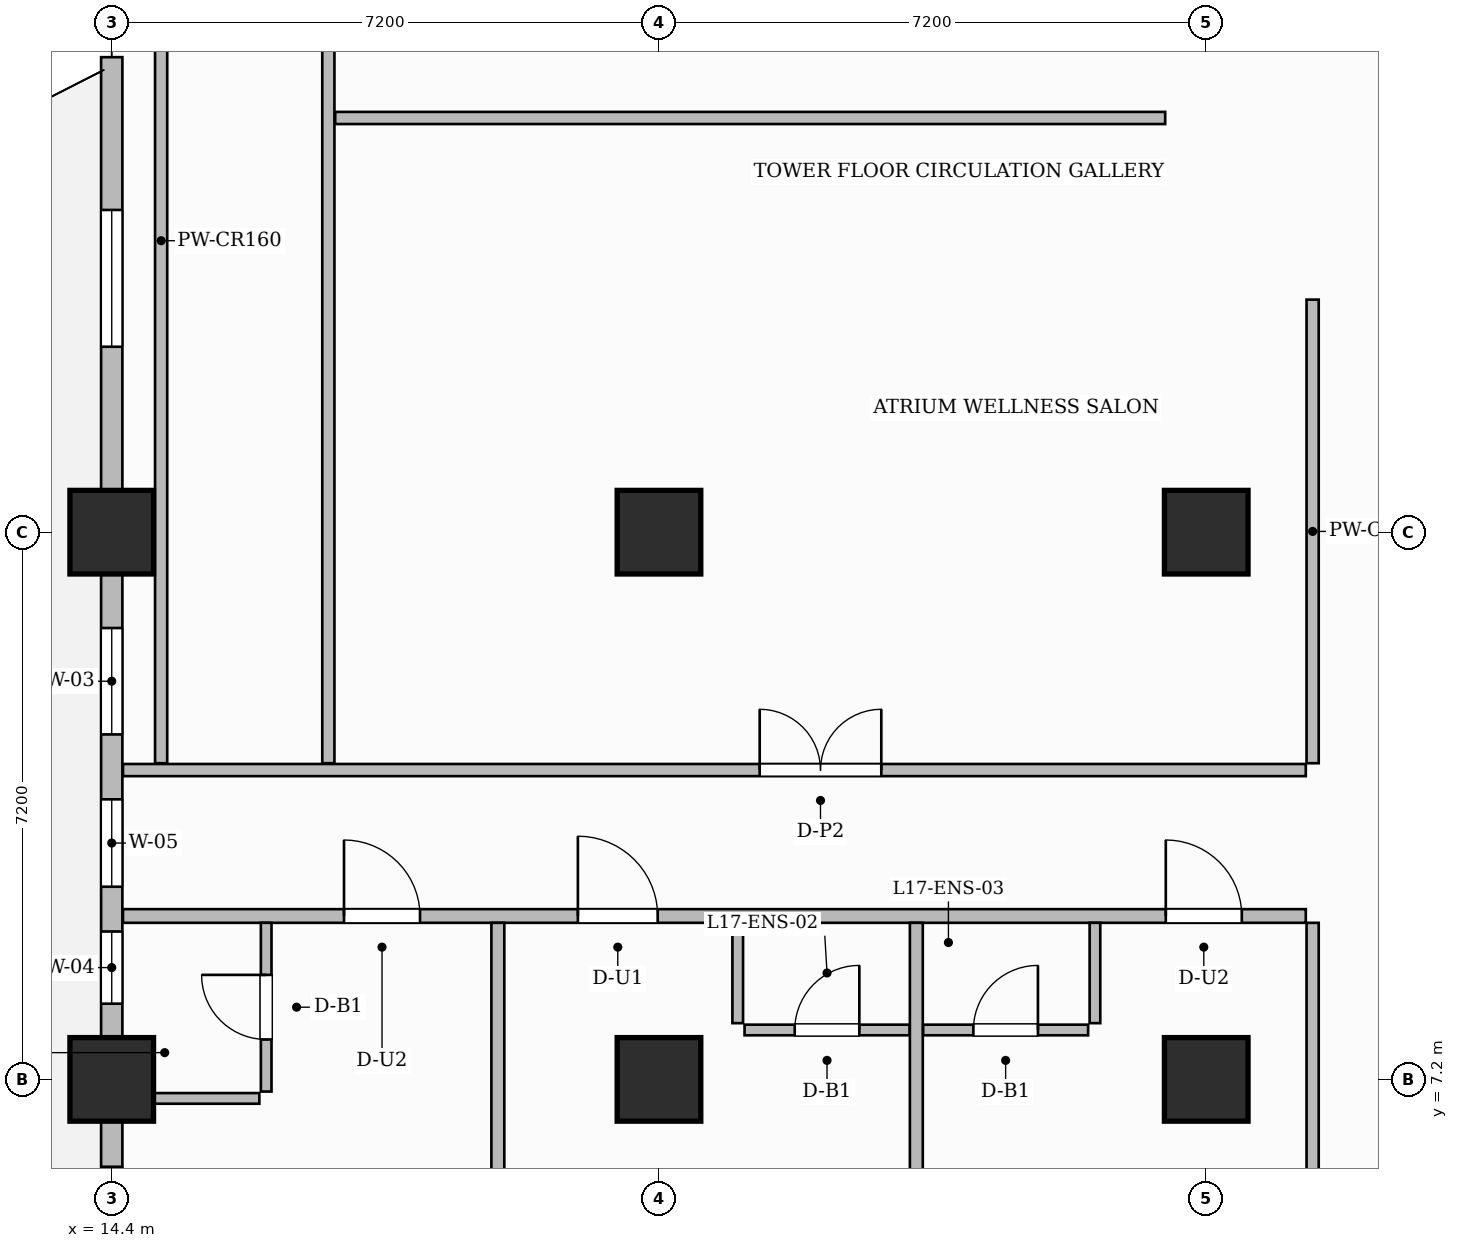
"""IFC4 building model, lengths in metres.
Left out: names, types, materials, properties, quantities, classifications, styles, units other than length and angle.
Written with IfcOpenShell. Run it as: python <this file> out.ifc"""

import sys

from ifc_helpers import new_model, si_unit, direction, frame, frame_2d, origin, origin_2d, place, context, subcontext, project, spatial, rectangle, extrude, source, transform, mapped, element, fill, save


model = new_model("IFC4")
c1 = context("Model", 3, precision=1e-05, world=origin(), true_north=direction((0.0, 1.0)))
c2 = subcontext(c1, "Body", "Model", "MODEL_VIEW")
j1 = project(units=[si_unit("LENGTHUNIT", "METRE"), si_unit("PLANEANGLEUNIT", "RADIAN")], contexts=[c1])
p1 = place(None, origin())
s1 = spatial("IfcSite", under=j1, at=p1, CompositionType="ELEMENT")
p2 = place(p1, origin())
s2 = spatial("IfcBuilding", under=s1, at=p2, CompositionType="ELEMENT")
p3 = place(p2, frame((0.0, 0.0, 73.1)))
s3 = spatial("IfcBuildingStorey", under=s2, at=p3, CompositionType="ELEMENT", Elevation=73.1)
m1 = source(origin(), c2, "Body", "SweptSolid", [
    extrude(rectangle(XDim=1.1, YDim=1.1, at=origin_2d()), origin(), (0.0, 0.0, 1.0), 3.7),
])
for number, where, z_axis, x_axis in (
    (1, (14.4, 7.2, 0.0), (0.0, 0.0, 1.0), (1.0, 0.0, 0.0)),
    (2, (14.4, 14.4, 0.0), (0.0, 0.0, 1.0), (1.0, 0.0, 0.0)),
    (3, (21.6, 7.2, 0.0), (0.0, 0.0, 1.0), (1.0, 0.0, 0.0)),
    (4, (21.6, 14.4, 0.0), (0.0, 0.0, 1.0), (1.0, 0.0, 0.0)),
    (5, (28.8, 7.2, 0.0), (0.0, 0.0, 1.0), (1.0, 0.0, 0.0)),
    (6, (28.8, 14.4, 0.0), (0.0, 0.0, 1.0), (1.0, 0.0, 0.0)),
):
    element("IfcColumn", number, at=place(p3, frame(where, z_axis=z_axis, x_axis=x_axis)), inside=s3, PredefinedType="COLUMN", context=c2, shape_type="MappedRepresentation", body=[
        mapped(m1, transform((0.0, 0.0, 0.0), scale=1.0)),
    ])
p4 = place(p3, frame((14.548, 9.35, 0.0), z_axis=(0.0, 0.0, 1.0), x_axis=(1.0, 0.0, 0.0)))
e7 = element("IfcWall", 7, at=p4, inside=s3, PredefinedType="PARTITIONING", context=c2, shape_type="SweptSolid", body=[
    extrude(rectangle(XDim=15.562, YDim=0.18, at=frame_2d((7.781, 0.0))), origin(), (0.0, 0.0, 1.0), 3.45),
])
p5 = place(p4, frame((2.908, 0.0, 0.0)))
e8 = element("IfcOpeningElement", 8, at=p5, cuts=e7, PredefinedType="OPENING", context=c2, shape_type="SweptSolid", body=[
    extrude(rectangle(XDim=1.0, YDim=2.2, at=frame_2d((0.5, 1.1))), frame((0.0, 0.1, 0.0), z_axis=(0.0, -1.0, 0.0), x_axis=(1.0, 0.0, 0.0)), (0.0, 0.0, 1.0), 0.2),
])
p6 = place(p4, frame((5.985, 0.0, 0.0)))
e9 = element("IfcOpeningElement", 9, at=p6, cuts=e7, PredefinedType="OPENING", context=c2, shape_type="SweptSolid", body=[
    extrude(rectangle(XDim=1.05, YDim=2.25, at=frame_2d((0.525, 1.125))), frame((0.0, 0.1, 0.0), z_axis=(0.0, -1.0, 0.0), x_axis=(1.0, 0.0, 0.0)), (0.0, 0.0, 1.0), 0.2),
])
p7 = place(p4, frame((13.72, 0.0, 0.0)))
e10 = element("IfcOpeningElement", 10, at=p7, cuts=e7, PredefinedType="OPENING", context=c2, shape_type="SweptSolid", body=[
    extrude(rectangle(XDim=1.0, YDim=2.2, at=frame_2d((0.5, 1.1))), frame((0.0, 0.1, 0.0), z_axis=(0.0, -1.0, 0.0), x_axis=(1.0, 0.0, 0.0)), (0.0, 0.0, 1.0), 0.2),
])
p8 = place(p3, frame((14.548, 11.27, 0.0), z_axis=(0.0, 0.0, 1.0), x_axis=(1.0, 0.0, 0.0)))
e11 = element("IfcWall", 11, at=p8, inside=s3, PredefinedType="PARTITIONING", context=c2, shape_type="SweptSolid", body=[
    extrude(rectangle(XDim=15.562, YDim=0.16, at=frame_2d((7.781, 0.0))), origin(), (0.0, 0.0, 1.0), 3.45),
])
p9 = place(p8, frame((8.377, 0.0, 0.0)))
e12 = element("IfcOpeningElement", 12, at=p9, cuts=e11, PredefinedType="OPENING", context=c2, shape_type="SweptSolid", body=[
    extrude(rectangle(XDim=1.6, YDim=2.4, at=frame_2d((0.8, 1.2))), frame((0.0, 0.09, 0.0), z_axis=(0.0, -1.0, 0.0), x_axis=(1.0, 0.0, 0.0)), (0.0, 0.0, 1.0), 0.18),
])
p10 = place(p3, frame((30.2, 11.36, 0.0), z_axis=(0.0, 0.0, 1.0), x_axis=(0.0, 1.0, 0.0)))
e13 = element("IfcWall", 13, at=p10, inside=s3, PredefinedType="PARTITIONING", context=c2, shape_type="SweptSolid", body=[
    extrude(rectangle(XDim=6.1, YDim=0.16, at=frame_2d((3.05, 0.0))), origin(), (0.0, 0.0, 1.0), 3.45),
])
p11 = place(p3, frame((30.2, 0.148, 0.0), z_axis=(0.0, 0.0, 1.0), x_axis=(0.0, 1.0, 0.0)))
e14 = element("IfcWall", 14, at=p11, inside=s3, PredefinedType="PARTITIONING", context=c2, shape_type="SweptSolid", body=[
    extrude(rectangle(XDim=9.112, YDim=0.16, at=frame_2d((4.556, 0.0))), origin(), (0.0, 0.0, 1.0), 3.45),
])
p12 = place(p11, frame((1.977, 0.0, 0.0)))
e15 = element("IfcOpeningElement", 15, at=p12, cuts=e14, PredefinedType="OPENING", context=c2, shape_type="SweptSolid", body=[
    extrude(rectangle(XDim=1.05, YDim=2.15, at=frame_2d((0.525, 1.075))), frame((0.0, 0.09, 0.0), z_axis=(0.0, -1.0, 0.0), x_axis=(1.0, 0.0, 0.0)), (0.0, 0.0, 1.0), 0.18),
])
p13 = place(p3, frame((19.48, 0.148, 0.0), z_axis=(0.0, 0.0, 1.0), x_axis=(0.0, 1.0, 0.0)))
e16 = element("IfcWall", 16, at=p13, inside=s3, PredefinedType="PARTITIONING", context=c2, shape_type="SweptSolid", body=[
    extrude(rectangle(XDim=9.112, YDim=0.17, at=frame_2d((4.556, 0.0))), origin(), (0.0, 0.0, 1.0), 3.45),
])
p14 = place(p3, frame((24.986, 0.148, 0.0), z_axis=(0.0, 0.0, 1.0), x_axis=(0.0, 1.0, 0.0)))
e17 = element("IfcWall", 17, at=p14, inside=s3, PredefinedType="PARTITIONING", context=c2, shape_type="SweptSolid", body=[
    extrude(rectangle(XDim=9.112, YDim=0.17, at=frame_2d((4.556, 0.0))), origin(), (0.0, 0.0, 1.0), 3.075),
])
p15 = place(p3, frame((16.432, 7.04, 0.0), z_axis=(0.0, 0.0, 1.0), x_axis=(0.0, 1.0, 0.0)))
e18 = element("IfcWall", 18, at=p15, inside=s3, PredefinedType="PARTITIONING", context=c2, shape_type="SweptSolid", body=[
    extrude(rectangle(XDim=2.22, YDim=0.14, at=frame_2d((1.11, 0.0))), origin(), (0.0, 0.0, 1.0), 3.45),
])
p16 = place(p15, frame((0.685, 0.0, 0.0)))
e19 = element("IfcOpeningElement", 19, at=p16, cuts=e18, PredefinedType="OPENING", context=c2, shape_type="SweptSolid", body=[
    extrude(rectangle(XDim=0.85, YDim=2.1, at=frame_2d((0.425, 1.05))), frame((0.0, 0.08, 0.0), z_axis=(0.0, -1.0, 0.0), x_axis=(1.0, 0.0, 0.0)), (0.0, 0.0, 1.0), 0.16),
])
p17 = place(p3, frame((14.49, 6.95, 0.0), z_axis=(0.0, 0.0, 1.0), x_axis=(1.0, 0.0, 0.0)))
e20 = element("IfcWall", 20, at=p17, inside=s3, PredefinedType="PARTITIONING", context=c2, shape_type="SweptSolid", body=[
    extrude(rectangle(XDim=1.852, YDim=0.14, at=frame_2d((0.926, 0.0))), origin(), (0.0, 0.0, 1.0), 2.885),
])
p18 = place(p3, frame((22.636, 7.94, 0.0), z_axis=(0.0, 0.0, 1.0), x_axis=(0.0, 1.0, 0.0)))
e21 = element("IfcWall", 21, at=p18, inside=s3, PredefinedType="PARTITIONING", context=c2, shape_type="SweptSolid", body=[
    extrude(rectangle(XDim=1.32, YDim=0.14, at=frame_2d((0.66, 0.0))), origin(), (0.0, 0.0, 1.0), 3.45),
])
p19 = place(p3, frame((22.726, 7.85, 0.0), z_axis=(0.0, 0.0, 1.0), x_axis=(1.0, 0.0, 0.0)))
e22 = element("IfcWall", 22, at=p19, inside=s3, PredefinedType="PARTITIONING", context=c2, shape_type="SweptSolid", body=[
    extrude(rectangle(XDim=2.17, YDim=0.14, at=frame_2d((1.085, 0.0))), origin(), (0.0, 0.0, 1.0), 3.45),
])
p20 = place(p19, frame((0.66, 0.0, 0.0)))
e23 = element("IfcOpeningElement", 23, at=p20, cuts=e22, PredefinedType="OPENING", context=c2, shape_type="SweptSolid", body=[
    extrude(rectangle(XDim=0.85, YDim=2.1, at=frame_2d((0.425, 1.05))), frame((0.0, 0.08, 0.0), z_axis=(0.0, -1.0, 0.0), x_axis=(1.0, 0.0, 0.0)), (0.0, 0.0, 1.0), 0.16),
])
p21 = place(p3, frame((27.336, 7.94, 0.0), z_axis=(0.0, 0.0, 1.0), x_axis=(0.0, 1.0, 0.0)))
e24 = element("IfcWall", 24, at=p21, inside=s3, PredefinedType="PARTITIONING", context=c2, shape_type="SweptSolid", body=[
    extrude(rectangle(XDim=1.32, YDim=0.14, at=frame_2d((0.66, 0.0))), origin(), (0.0, 0.0, 1.0), 3.45),
])
p22 = place(p3, frame((25.076, 7.85, 0.0), z_axis=(0.0, 0.0, 1.0), x_axis=(1.0, 0.0, 0.0)))
e25 = element("IfcWall", 25, at=p22, inside=s3, PredefinedType="PARTITIONING", context=c2, shape_type="SweptSolid", body=[
    extrude(rectangle(XDim=2.17, YDim=0.14, at=frame_2d((1.085, 0.0))), origin(), (0.0, 0.0, 1.0), 3.45),
])
p23 = place(p22, frame((0.66, 0.0, 0.0)))
e26 = element("IfcOpeningElement", 26, at=p23, cuts=e25, PredefinedType="OPENING", context=c2, shape_type="SweptSolid", body=[
    extrude(rectangle(XDim=0.85, YDim=2.1, at=frame_2d((0.425, 1.05))), frame((0.0, 0.08, 0.0), z_axis=(0.0, -1.0, 0.0), x_axis=(1.0, 0.0, 0.0)), (0.0, 0.0, 1.0), 0.16),
])
for number, where, z_axis, x_axis in (
    (27, (15.05, 11.36, 0.0), (0.0, 0.0, 1.0), (0.0, 1.0, 0.0)),
    (28, (17.25, 11.36, 0.0), (0.0, 0.0, 1.0), (0.0, 1.0, 0.0)),
):
    element("IfcWall", number, at=place(p3, frame(where, z_axis=z_axis, x_axis=x_axis)), inside=s3, PredefinedType="PARTITIONING", context=c2, shape_type="SweptSolid", body=[
        extrude(rectangle(XDim=13.75, YDim=0.16, at=frame_2d((6.875, 0.0))), origin(), (0.0, 0.0, 1.0), 3.45),
    ])
p24 = place(p3, frame((17.34, 19.85, 0.0), z_axis=(0.0, 0.0, 1.0), x_axis=(1.0, 0.0, 0.0)))
e29 = element("IfcWall", 29, at=p24, inside=s3, PredefinedType="PARTITIONING", context=c2, shape_type="SweptSolid", body=[
    extrude(rectangle(XDim=10.92, YDim=0.16, at=frame_2d((5.46, 0.0))), origin(), (0.0, 0.0, 1.0), 3.45),
])
p25 = place(p3, frame((14.4, 0.05, 0.0), z_axis=(0.0, 0.0, 1.0), x_axis=(0.0, 1.0, 0.0)))
e30 = element("IfcWall", 30, at=p25, inside=s3, PredefinedType="SOLIDWALL", context=c2, shape_type="SweptSolid", body=[
    extrude(rectangle(XDim=20.6, YDim=0.28, at=frame_2d((10.3, 0.0))), origin(), (0.0, 0.0, 1.0), 2.885),
])
p26 = place(p25, frame((2.75, 0.0, 0.0)))
e31 = element("IfcOpeningElement", 31, at=p26, cuts=e30, PredefinedType="OPENING", context=c2, shape_type="SweptSolid", body=[
    extrude(rectangle(XDim=1.2, YDim=2.2, at=frame_2d((0.6, 1.1))), frame((0.0, 0.15, 0.0), z_axis=(0.0, -1.0, 0.0), x_axis=(1.0, 0.0, 0.0)), (0.0, 0.0, 1.0), 0.3),
])
p27 = place(p25, frame((1.025, 0.0, 0.8)))
e32 = element("IfcOpeningElement", 32, at=p27, cuts=e30, PredefinedType="OPENING", context=c2, shape_type="SweptSolid", body=[
    extrude(rectangle(XDim=1.15, YDim=1.8, at=frame_2d((0.575, 0.9))), frame((0.0, 0.15, 0.0), z_axis=(0.0, -1.0, 0.0), x_axis=(1.0, 0.0, 0.0)), (0.0, 0.0, 1.0), 0.3),
])
p28 = place(p25, frame((4.6, 0.0, 0.8)))
e33 = element("IfcOpeningElement", 33, at=p28, cuts=e30, PredefinedType="OPENING", context=c2, shape_type="SweptSolid", body=[
    extrude(rectangle(XDim=1.4, YDim=1.85, at=frame_2d((0.7, 0.925))), frame((0.0, 0.15, 0.0), z_axis=(0.0, -1.0, 0.0), x_axis=(1.0, 0.0, 0.0)), (0.0, 0.0, 1.0), 0.3),
])
p29 = place(p25, frame((8.146, 0.0, 0.8)))
e34 = element("IfcOpeningElement", 34, at=p29, cuts=e30, PredefinedType="OPENING", context=c2, shape_type="SweptSolid", body=[
    extrude(rectangle(XDim=0.95, YDim=1.75, at=frame_2d((0.475, 0.875))), frame((0.0, 0.15, 0.0), z_axis=(0.0, -1.0, 0.0), x_axis=(1.0, 0.0, 0.0)), (0.0, 0.0, 1.0), 0.3),
])
p30 = place(p25, frame((9.685, 0.0, 0.8)))
e35 = element("IfcOpeningElement", 35, at=p30, cuts=e30, PredefinedType="OPENING", context=c2, shape_type="SweptSolid", body=[
    extrude(rectangle(XDim=1.15, YDim=1.8, at=frame_2d((0.575, 0.9))), frame((0.0, 0.15, 0.0), z_axis=(0.0, -1.0, 0.0), x_axis=(1.0, 0.0, 0.0)), (0.0, 0.0, 1.0), 0.3),
])
p31 = place(p25, frame((11.689, 0.0, 0.8)))
e36 = element("IfcOpeningElement", 36, at=p31, cuts=e30, PredefinedType="OPENING", context=c2, shape_type="SweptSolid", body=[
    extrude(rectangle(XDim=1.4, YDim=1.85, at=frame_2d((0.7, 0.925))), frame((0.0, 0.15, 0.0), z_axis=(0.0, -1.0, 0.0), x_axis=(1.0, 0.0, 0.0)), (0.0, 0.0, 1.0), 0.3),
])
p32 = place(p25, frame((16.79, 0.0, 0.8)))
e37 = element("IfcOpeningElement", 37, at=p32, cuts=e30, PredefinedType="OPENING", context=c2, shape_type="SweptSolid", body=[
    extrude(rectangle(XDim=1.8, YDim=1.85, at=frame_2d((0.9, 0.925))), frame((0.0, 0.15, 0.0), z_axis=(0.0, -1.0, 0.0), x_axis=(1.0, 0.0, 0.0)), (0.0, 0.0, 1.0), 0.3),
])
m2 = source(origin(), c2, "Body", "SweptSolid", [
    extrude(rectangle(XDim=0.85, YDim=2.1, at=frame_2d((0.425, 1.05))), frame((0.0, 0.025, 0.0), z_axis=(0.0, -1.0, 0.0), x_axis=(1.0, 0.0, 0.0)), (0.0, 0.0, 1.0), 0.05),
])
p33 = place(p16, origin())
e38 = element("IfcDoor", 38, at=p33, inside=s3, OperationType="SINGLE_SWING_RIGHT", PredefinedType="DOOR", context=c2, shape_type="MappedRepresentation", body=[
    mapped(m2, transform((0.0, 0.0, 0.0), scale=1.0)),
])
fill(e19, e38)
m3 = source(origin(), c2, "Body", "SweptSolid", [
    extrude(rectangle(XDim=1.0, YDim=2.2, at=frame_2d((0.5, 1.1))), frame((0.0, 0.025, 0.0), z_axis=(0.0, -1.0, 0.0), x_axis=(1.0, 0.0, 0.0)), (0.0, 0.0, 1.0), 0.05),
])
p34 = place(p5, origin())
e39 = element("IfcDoor", 39, at=p34, inside=s3, OperationType="SINGLE_SWING_LEFT", PredefinedType="DOOR", context=c2, shape_type="MappedRepresentation", body=[
    mapped(m3, transform((0.0, 0.0, 0.0), scale=1.0)),
])
fill(e8, e39)
p35 = place(p20, origin())
e40 = element("IfcDoor", 40, at=p35, inside=s3, OperationType="SINGLE_SWING_RIGHT", PredefinedType="DOOR", context=c2, shape_type="MappedRepresentation", body=[
    mapped(m2, transform((0.0, 0.0, 0.0), scale=1.0)),
])
fill(e23, e40)
m4 = source(origin(), c2, "Body", "SweptSolid", [
    extrude(rectangle(XDim=1.05, YDim=2.25, at=frame_2d((0.525, 1.125))), frame((0.0, 0.025, 0.0), z_axis=(0.0, -1.0, 0.0), x_axis=(1.0, 0.0, 0.0)), (0.0, 0.0, 1.0), 0.05),
])
p36 = place(p6, origin())
e41 = element("IfcDoor", 41, at=p36, inside=s3, OperationType="SINGLE_SWING_LEFT", PredefinedType="DOOR", context=c2, shape_type="MappedRepresentation", body=[
    mapped(m4, transform((0.0, 0.0, 0.0), scale=1.0)),
])
fill(e9, e41)
p37 = place(p23, origin())
e42 = element("IfcDoor", 42, at=p37, inside=s3, OperationType="SINGLE_SWING_RIGHT", PredefinedType="DOOR", context=c2, shape_type="MappedRepresentation", body=[
    mapped(m2, transform((0.0, 0.0, 0.0), scale=1.0)),
])
fill(e26, e42)
p38 = place(p7, origin())
e43 = element("IfcDoor", 43, at=p38, inside=s3, OperationType="SINGLE_SWING_LEFT", PredefinedType="DOOR", context=c2, shape_type="MappedRepresentation", body=[
    mapped(m3, transform((0.0, 0.0, 0.0), scale=1.0)),
])
fill(e10, e43)
m5 = source(origin(), c2, "Body", "SweptSolid", [
    extrude(rectangle(XDim=1.6, YDim=2.4, at=frame_2d((0.8, 1.2))), frame((0.0, 0.025, 0.0), z_axis=(0.0, -1.0, 0.0), x_axis=(1.0, 0.0, 0.0)), (0.0, 0.0, 1.0), 0.05),
])
p39 = place(p9, origin())
e44 = element("IfcDoor", 44, at=p39, inside=s3, OperationType="DOUBLE_DOOR_SINGLE_SWING", PredefinedType="DOOR", context=c2, shape_type="MappedRepresentation", body=[
    mapped(m5, transform((0.0, 0.0, 0.0), scale=1.0)),
])
fill(e12, e44)
m6 = source(origin(), c2, "Body", "SweptSolid", [
    extrude(rectangle(XDim=1.4, YDim=1.85, at=frame_2d((0.7, 0.925))), frame((0.0, 0.03, 0.0), z_axis=(0.0, -1.0, 0.0), x_axis=(1.0, 0.0, 0.0)), (0.0, 0.0, 1.0), 0.06),
])
p40 = place(p28, origin())
e45 = element("IfcWindow", 45, at=p40, inside=s3, PartitioningType="SINGLE_PANEL", PredefinedType="WINDOW", context=c2, shape_type="MappedRepresentation", body=[
    mapped(m6, transform((0.0, 0.0, 0.0), scale=1.0)),
])
fill(e33, e45)
m7 = source(origin(), c2, "Body", "SweptSolid", [
    extrude(rectangle(XDim=0.95, YDim=1.75, at=frame_2d((0.475, 0.875))), frame((0.0, 0.03, 0.0), z_axis=(0.0, -1.0, 0.0), x_axis=(1.0, 0.0, 0.0)), (0.0, 0.0, 1.0), 0.06),
])
p41 = place(p29, origin())
e46 = element("IfcWindow", 46, at=p41, inside=s3, PartitioningType="SINGLE_PANEL", PredefinedType="WINDOW", context=c2, shape_type="MappedRepresentation", body=[
    mapped(m7, transform((0.0, 0.0, 0.0), scale=1.0)),
])
fill(e34, e46)
m8 = source(origin(), c2, "Body", "SweptSolid", [
    extrude(rectangle(XDim=1.15, YDim=1.8, at=frame_2d((0.575, 0.9))), frame((0.0, 0.03, 0.0), z_axis=(0.0, -1.0, 0.0), x_axis=(1.0, 0.0, 0.0)), (0.0, 0.0, 1.0), 0.06),
])
p42 = place(p30, origin())
e47 = element("IfcWindow", 47, at=p42, inside=s3, PartitioningType="SINGLE_PANEL", PredefinedType="WINDOW", context=c2, shape_type="MappedRepresentation", body=[
    mapped(m8, transform((0.0, 0.0, 0.0), scale=1.0)),
])
fill(e35, e47)
p43 = place(p31, origin())
e48 = element("IfcWindow", 48, at=p43, inside=s3, PartitioningType="SINGLE_PANEL", PredefinedType="WINDOW", context=c2, shape_type="MappedRepresentation", body=[
    mapped(m6, transform((0.0, 0.0, 0.0), scale=1.0)),
])
fill(e36, e48)
m9 = source(origin(), c2, "Body", "SweptSolid", [
    extrude(rectangle(XDim=1.8, YDim=1.85, at=frame_2d((0.9, 0.925))), frame((0.0, 0.03, 0.0), z_axis=(0.0, -1.0, 0.0), x_axis=(1.0, 0.0, 0.0)), (0.0, 0.0, 1.0), 0.06),
])
p44 = place(p32, origin())
e49 = element("IfcWindow", 49, at=p44, inside=s3, PartitioningType="DOUBLE_PANEL_VERTICAL", PredefinedType="WINDOW", context=c2, shape_type="MappedRepresentation", body=[
    mapped(m9, transform((0.0, 0.0, 0.0), scale=1.0)),
])
fill(e37, e49)
save(model, sys.argv[1])
